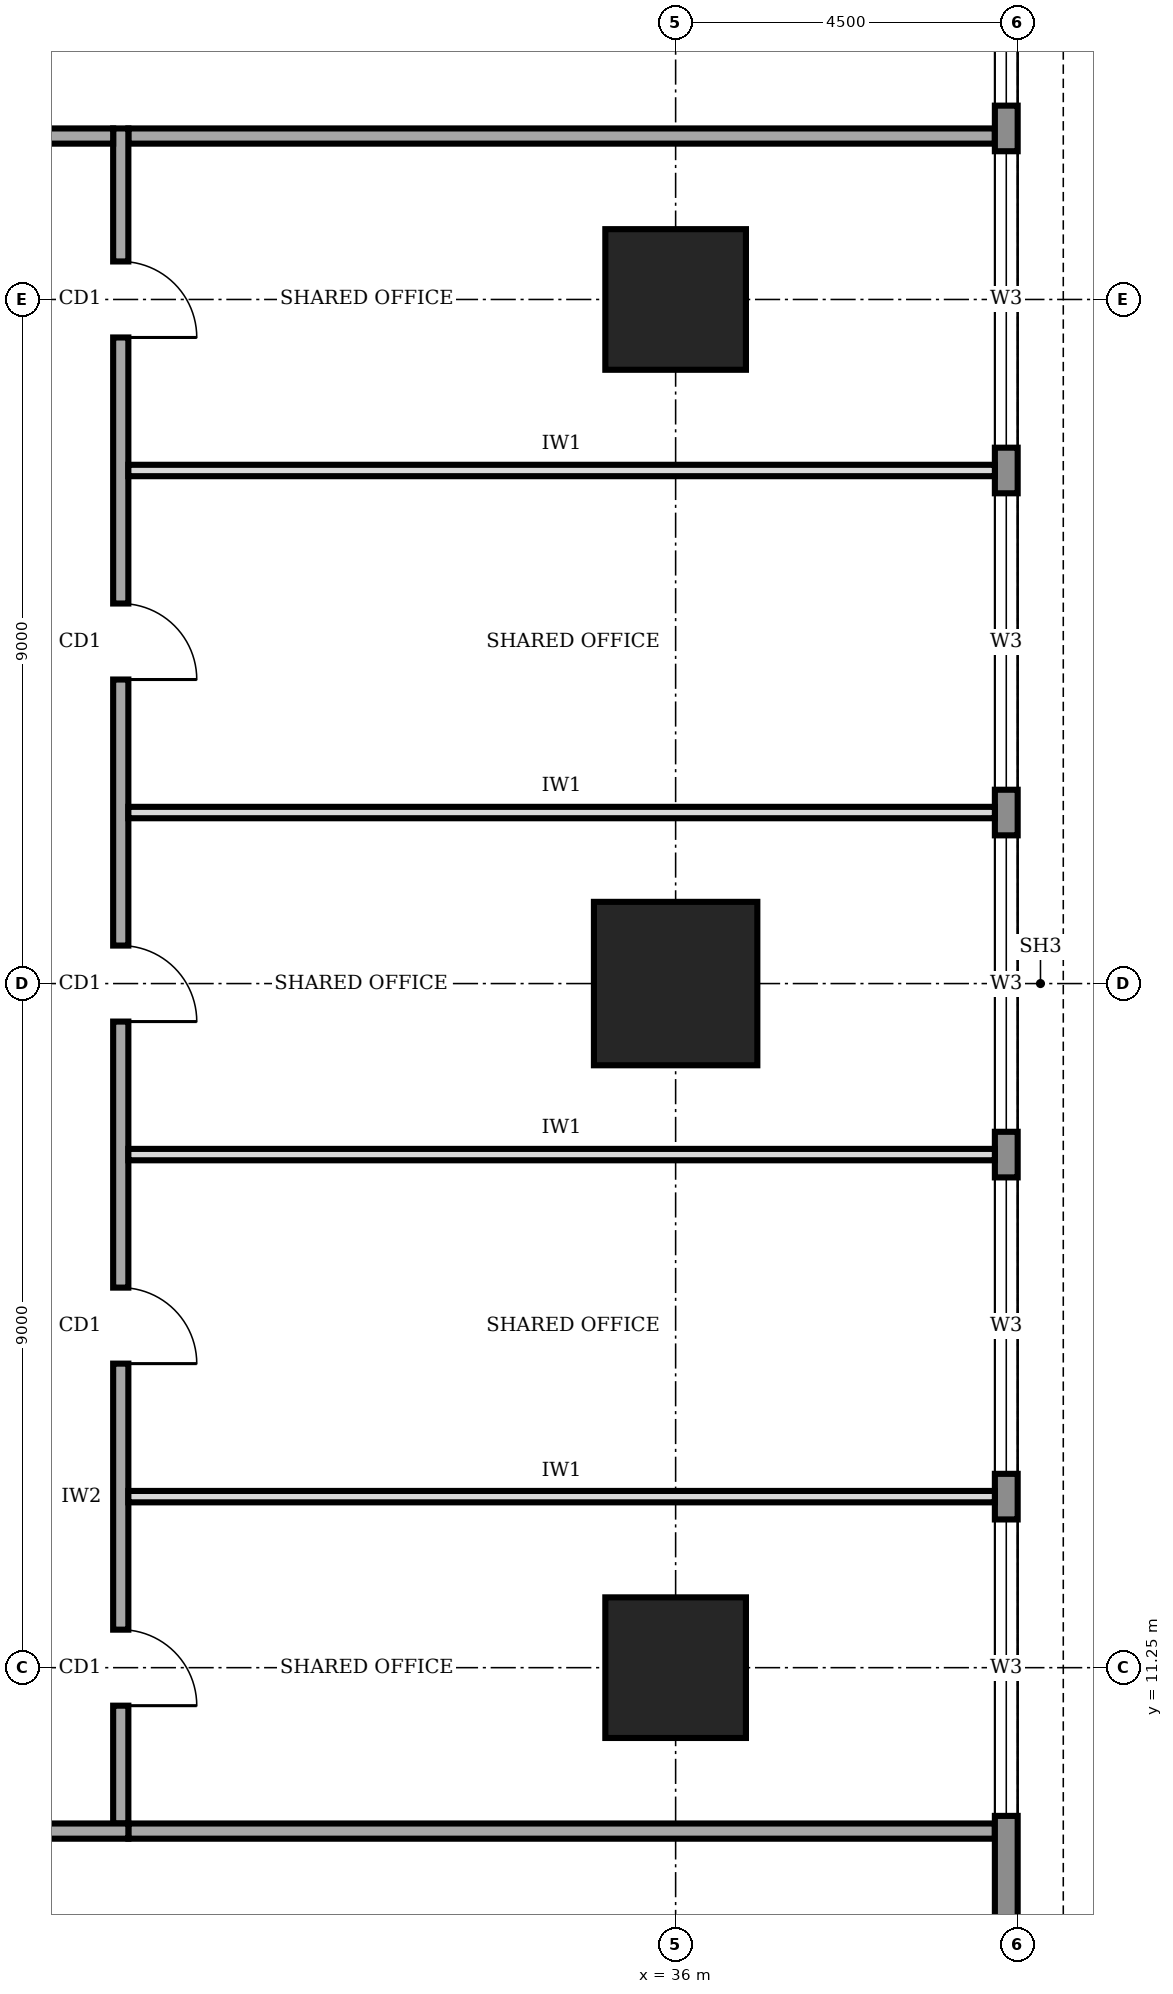
"""IFC4 building model, lengths in metres.
Left out: names, types, materials, properties, quantities, classifications, styles, units other than length and angle.
Written with IfcOpenShell. Run it as: python <this file> out.ifc"""

import sys

from ifc_helpers import new_model, si_unit, direction, frame, frame_2d, origin, origin_2d, place, context, subcontext, project, spatial, rectangle, extrude, element, fill, save


model = new_model("IFC4")
c1 = context("Model", 3, precision=1e-05, world=origin(), true_north=direction((0.0, 1.0)))
c2 = subcontext(c1, "Body", "Model", "MODEL_VIEW")
j1 = project(units=[si_unit("LENGTHUNIT", "METRE"), si_unit("PLANEANGLEUNIT", "RADIAN")], contexts=[c1])
p1 = place(None, origin())
s1 = spatial("IfcSite", under=j1, at=p1, CompositionType="ELEMENT")
p2 = place(p1, origin())
s2 = spatial("IfcBuilding", under=s1, at=p2, CompositionType="ELEMENT")
p3 = place(p2, frame((0.0, 0.0, 253.0)))
s3 = spatial("IfcBuildingStorey", under=s2, at=p3, CompositionType="ELEMENT", Elevation=253.0)
p4 = place(p3, frame((36.0, 11.25, 0.0), z_axis=(0.0, 0.0, 1.0), x_axis=(1.0, 0.0, 0.0)))
e1 = element("IfcColumn", 1, at=p4, inside=s3, PredefinedType="COLUMN", context=c2, shape_type="SweptSolid", body=[
    extrude(rectangle(XDim=1.85, YDim=1.85, at=origin_2d()), origin(), (0.0, 0.0, 1.0), 4.0),
])
p5 = place(p3, frame((36.0, 20.25, 0.0), z_axis=(0.0, 0.0, 1.0), x_axis=(1.0, 0.0, 0.0)))
e2 = element("IfcColumn", 2, at=p5, inside=s3, PredefinedType="COLUMN", context=c2, shape_type="SweptSolid", body=[
    extrude(rectangle(XDim=2.15, YDim=2.15, at=origin_2d()), origin(), (0.0, 0.0, 1.0), 4.0),
])
p6 = place(p3, frame((36.0, 29.25, 0.0), z_axis=(0.0, 0.0, 1.0), x_axis=(1.0, 0.0, 0.0)))
e3 = element("IfcColumn", 3, at=p6, inside=s3, PredefinedType="COLUMN", context=c2, shape_type="SweptSolid", body=[
    extrude(rectangle(XDim=1.85, YDim=1.85, at=origin_2d()), origin(), (0.0, 0.0, 1.0), 4.0),
])
p7 = place(p3, frame((40.35, 4.52, 0.0), z_axis=(0.0, 0.0, 1.0), x_axis=(0.0, 1.0, 0.0)))
e4 = element("IfcWall", 4, at=p7, inside=s3, PredefinedType="STANDARD", context=c2, shape_type="SweptSolid", body=[
    extrude(rectangle(XDim=31.46, YDim=0.3, at=frame_2d((15.73, 0.0))), origin(), (0.0, 0.0, 1.0), 3.75),
])
p8 = place(p7, frame((4.78, 0.0, 0.95)))
e5 = element("IfcOpeningElement", 5, at=p8, cuts=e4, PredefinedType="OPENING", context=c2, shape_type="SweptSolid", body=[
    extrude(rectangle(XDim=3.9, YDim=1.8, at=frame_2d((1.95, 0.9))), frame((0.0, 0.16, 0.0), z_axis=(0.0, -1.0, 0.0), x_axis=(1.0, 0.0, 0.0)), (0.0, 0.0, 1.0), 0.32),
])
p9 = place(p7, frame((9.28, 0.0, 0.95)))
e6 = element("IfcOpeningElement", 6, at=p9, cuts=e4, PredefinedType="OPENING", context=c2, shape_type="SweptSolid", body=[
    extrude(rectangle(XDim=3.9, YDim=1.8, at=frame_2d((1.95, 0.9))), frame((0.0, 0.16, 0.0), z_axis=(0.0, -1.0, 0.0), x_axis=(1.0, 0.0, 0.0)), (0.0, 0.0, 1.0), 0.32),
])
p10 = place(p7, frame((13.78, 0.0, 0.95)))
e7 = element("IfcOpeningElement", 7, at=p10, cuts=e4, PredefinedType="OPENING", context=c2, shape_type="SweptSolid", body=[
    extrude(rectangle(XDim=3.9, YDim=1.8, at=frame_2d((1.95, 0.9))), frame((0.0, 0.16, 0.0), z_axis=(0.0, -1.0, 0.0), x_axis=(1.0, 0.0, 0.0)), (0.0, 0.0, 1.0), 0.32),
])
p11 = place(p7, frame((18.28, 0.0, 0.95)))
e8 = element("IfcOpeningElement", 8, at=p11, cuts=e4, PredefinedType="OPENING", context=c2, shape_type="SweptSolid", body=[
    extrude(rectangle(XDim=3.9, YDim=1.8, at=frame_2d((1.95, 0.9))), frame((0.0, 0.16, 0.0), z_axis=(0.0, -1.0, 0.0), x_axis=(1.0, 0.0, 0.0)), (0.0, 0.0, 1.0), 0.32),
])
p12 = place(p7, frame((22.78, 0.0, 0.95)))
e9 = element("IfcOpeningElement", 9, at=p12, cuts=e4, PredefinedType="OPENING", context=c2, shape_type="SweptSolid", body=[
    extrude(rectangle(XDim=3.9, YDim=1.8, at=frame_2d((1.95, 0.9))), frame((0.0, 0.16, 0.0), z_axis=(0.0, -1.0, 0.0), x_axis=(1.0, 0.0, 0.0)), (0.0, 0.0, 1.0), 0.32),
])
p13 = place(p7, frame((27.28, 0.0, 0.95)))
e10 = element("IfcOpeningElement", 10, at=p13, cuts=e4, PredefinedType="OPENING", context=c2, shape_type="SweptSolid", body=[
    extrude(rectangle(XDim=3.9, YDim=1.8, at=frame_2d((1.95, 0.9))), frame((0.0, 0.16, 0.0), z_axis=(0.0, -1.0, 0.0), x_axis=(1.0, 0.0, 0.0)), (0.0, 0.0, 1.0), 0.32),
])
p14 = place(p3, frame((11.9, 9.1, 0.0), z_axis=(0.0, 0.0, 1.0), x_axis=(1.0, 0.0, 0.0)))
e11 = element("IfcWall", 11, at=p14, inside=s3, PredefinedType="SOLIDWALL", context=c2, shape_type="SweptSolid", body=[
    extrude(rectangle(XDim=16.9, YDim=0.2, at=frame_2d((8.45, 0.0))), origin(), (0.0, 0.0, 1.0), 3.75),
])
p15 = place(p14, frame((2.25, 0.0, 0.0)))
e12 = element("IfcOpeningElement", 12, at=p15, cuts=e11, PredefinedType="OPENING", context=c2, shape_type="SweptSolid", body=[
    extrude(rectangle(XDim=1.4, YDim=2.1, at=frame_2d((0.7, 1.05))), frame((0.0, 0.11, 0.0), z_axis=(0.0, -1.0, 0.0), x_axis=(1.0, 0.0, 0.0)), (0.0, 0.0, 1.0), 0.22),
])
p16 = place(p14, frame((10.8, 0.0, 0.0)))
e13 = element("IfcOpeningElement", 13, at=p16, cuts=e11, PredefinedType="OPENING", context=c2, shape_type="SweptSolid", body=[
    extrude(rectangle(XDim=1.4, YDim=2.1, at=frame_2d((0.7, 1.05))), frame((0.0, 0.11, 0.0), z_axis=(0.0, -1.0, 0.0), x_axis=(1.0, 0.0, 0.0)), (0.0, 0.0, 1.0), 0.22),
])
p17 = place(p3, frame((28.7, 9.2, 0.0), z_axis=(0.0, 0.0, 1.0), x_axis=(0.0, 1.0, 0.0)))
e14 = element("IfcWall", 14, at=p17, inside=s3, PredefinedType="SOLIDWALL", context=c2, shape_type="SweptSolid", body=[
    extrude(rectangle(XDim=22.3, YDim=0.2, at=frame_2d((11.15, 0.0))), origin(), (0.0, 0.0, 1.0), 3.75),
])
p18 = place(p17, frame((1.55, 0.0, 0.0)))
e15 = element("IfcOpeningElement", 15, at=p18, cuts=e14, PredefinedType="OPENING", context=c2, shape_type="SweptSolid", body=[
    extrude(rectangle(XDim=1.0, YDim=2.1, at=frame_2d((0.5, 1.05))), frame((0.0, 0.11, 0.0), z_axis=(0.0, -1.0, 0.0), x_axis=(1.0, 0.0, 0.0)), (0.0, 0.0, 1.0), 0.22),
])
p19 = place(p17, frame((6.05, 0.0, 0.0)))
e16 = element("IfcOpeningElement", 16, at=p19, cuts=e14, PredefinedType="OPENING", context=c2, shape_type="SweptSolid", body=[
    extrude(rectangle(XDim=1.0, YDim=2.1, at=frame_2d((0.5, 1.05))), frame((0.0, 0.11, 0.0), z_axis=(0.0, -1.0, 0.0), x_axis=(1.0, 0.0, 0.0)), (0.0, 0.0, 1.0), 0.22),
])
p20 = place(p17, frame((10.55, 0.0, 0.0)))
e17 = element("IfcOpeningElement", 17, at=p20, cuts=e14, PredefinedType="OPENING", context=c2, shape_type="SweptSolid", body=[
    extrude(rectangle(XDim=1.0, YDim=2.1, at=frame_2d((0.5, 1.05))), frame((0.0, 0.11, 0.0), z_axis=(0.0, -1.0, 0.0), x_axis=(1.0, 0.0, 0.0)), (0.0, 0.0, 1.0), 0.22),
])
p21 = place(p17, frame((15.05, 0.0, 0.0)))
e18 = element("IfcOpeningElement", 18, at=p21, cuts=e14, PredefinedType="OPENING", context=c2, shape_type="SweptSolid", body=[
    extrude(rectangle(XDim=1.0, YDim=2.1, at=frame_2d((0.5, 1.05))), frame((0.0, 0.11, 0.0), z_axis=(0.0, -1.0, 0.0), x_axis=(1.0, 0.0, 0.0)), (0.0, 0.0, 1.0), 0.22),
])
p22 = place(p17, frame((19.55, 0.0, 0.0)))
e19 = element("IfcOpeningElement", 19, at=p22, cuts=e14, PredefinedType="OPENING", context=c2, shape_type="SweptSolid", body=[
    extrude(rectangle(XDim=1.0, YDim=2.1, at=frame_2d((0.5, 1.05))), frame((0.0, 0.11, 0.0), z_axis=(0.0, -1.0, 0.0), x_axis=(1.0, 0.0, 0.0)), (0.0, 0.0, 1.0), 0.22),
])
p23 = place(p3, frame((28.6, 31.4, 0.0), z_axis=(0.0, 0.0, 1.0), x_axis=(-1.0, 0.0, 0.0)))
e20 = element("IfcWall", 20, at=p23, inside=s3, PredefinedType="SOLIDWALL", context=c2, shape_type="SweptSolid", body=[
    extrude(rectangle(XDim=16.9, YDim=0.2, at=frame_2d((8.45, 0.0))), origin(), (0.0, 0.0, 1.0), 3.75),
])
p24 = place(p23, frame((15.425, 0.0, 0.0)))
e21 = element("IfcOpeningElement", 21, at=p24, cuts=e20, PredefinedType="OPENING", context=c2, shape_type="SweptSolid", body=[
    extrude(rectangle(XDim=1.0, YDim=2.1, at=frame_2d((0.5, 1.05))), frame((0.0, 0.11, 0.0), z_axis=(0.0, -1.0, 0.0), x_axis=(1.0, 0.0, 0.0)), (0.0, 0.0, 1.0), 0.22),
])
p25 = place(p23, frame((10.1, 0.0, 0.0)))
e22 = element("IfcOpeningElement", 22, at=p25, cuts=e20, PredefinedType="OPENING", context=c2, shape_type="SweptSolid", body=[
    extrude(rectangle(XDim=1.0, YDim=2.1, at=frame_2d((0.5, 1.05))), frame((0.0, 0.11, 0.0), z_axis=(0.0, -1.0, 0.0), x_axis=(1.0, 0.0, 0.0)), (0.0, 0.0, 1.0), 0.22),
])
p26 = place(p23, frame((2.25, 0.0, 0.0)))
e23 = element("IfcOpeningElement", 23, at=p26, cuts=e20, PredefinedType="OPENING", context=c2, shape_type="SweptSolid", body=[
    extrude(rectangle(XDim=1.4, YDim=2.1, at=frame_2d((0.7, 1.05))), frame((0.0, 0.11, 0.0), z_axis=(0.0, -1.0, 0.0), x_axis=(1.0, 0.0, 0.0)), (0.0, 0.0, 1.0), 0.22),
])
for number, where, z_axis, x_axis in (
    (24, (28.8, 9.1, 0.0), (0.0, 0.0, 1.0), (1.0, 0.0, 0.0)),
    (25, (28.8, 31.4, 0.0), (0.0, 0.0, 1.0), (1.0, 0.0, 0.0)),
):
    element("IfcWall", number, at=place(p3, frame(where, z_axis=z_axis, x_axis=x_axis)), inside=s3, PredefinedType="SOLIDWALL", context=c2, shape_type="SweptSolid", body=[
        extrude(rectangle(XDim=11.4, YDim=0.2, at=frame_2d((5.7, 0.0))), origin(), (0.0, 0.0, 1.0), 3.75),
    ])
for number, where, z_axis, x_axis in (
    (26, (28.8, 13.5, 0.0), (0.0, 0.0, 1.0), (1.0, 0.0, 0.0)),
    (27, (28.8, 18.0, 0.0), (0.0, 0.0, 1.0), (1.0, 0.0, 0.0)),
    (28, (28.8, 22.5, 0.0), (0.0, 0.0, 1.0), (1.0, 0.0, 0.0)),
    (29, (28.8, 27.0, 0.0), (0.0, 0.0, 1.0), (1.0, 0.0, 0.0)),
):
    element("IfcWall", number, at=place(p3, frame(where, z_axis=z_axis, x_axis=x_axis)), inside=s3, PredefinedType="PARTITIONING", context=c2, shape_type="SweptSolid", body=[
        extrude(rectangle(XDim=11.4, YDim=0.15, at=frame_2d((5.7, 0.0))), origin(), (0.0, 0.0, 1.0), 3.75),
    ])
p27 = place(p8, origin())
e30 = element("IfcWindow", 30, at=p27, inside=s3, PartitioningType="SINGLE_PANEL", PredefinedType="WINDOW", context=c2, shape_type="SweptSolid", body=[
    extrude(rectangle(XDim=3.9, YDim=1.8, at=frame_2d((1.95, 0.9))), frame((0.0, 0.03, 0.0), z_axis=(0.0, -1.0, 0.0), x_axis=(1.0, 0.0, 0.0)), (0.0, 0.0, 1.0), 0.06),
])
fill(e5, e30)
p28 = place(p9, origin())
e31 = element("IfcWindow", 31, at=p28, inside=s3, PartitioningType="SINGLE_PANEL", PredefinedType="WINDOW", context=c2, shape_type="SweptSolid", body=[
    extrude(rectangle(XDim=3.9, YDim=1.8, at=frame_2d((1.95, 0.9))), frame((0.0, 0.03, 0.0), z_axis=(0.0, -1.0, 0.0), x_axis=(1.0, 0.0, 0.0)), (0.0, 0.0, 1.0), 0.06),
])
fill(e6, e31)
p29 = place(p10, origin())
e32 = element("IfcWindow", 32, at=p29, inside=s3, PartitioningType="SINGLE_PANEL", PredefinedType="WINDOW", context=c2, shape_type="SweptSolid", body=[
    extrude(rectangle(XDim=3.9, YDim=1.8, at=frame_2d((1.95, 0.9))), frame((0.0, 0.03, 0.0), z_axis=(0.0, -1.0, 0.0), x_axis=(1.0, 0.0, 0.0)), (0.0, 0.0, 1.0), 0.06),
])
fill(e7, e32)
p30 = place(p11, origin())
e33 = element("IfcWindow", 33, at=p30, inside=s3, PartitioningType="SINGLE_PANEL", PredefinedType="WINDOW", context=c2, shape_type="SweptSolid", body=[
    extrude(rectangle(XDim=3.9, YDim=1.8, at=frame_2d((1.95, 0.9))), frame((0.0, 0.03, 0.0), z_axis=(0.0, -1.0, 0.0), x_axis=(1.0, 0.0, 0.0)), (0.0, 0.0, 1.0), 0.06),
])
fill(e8, e33)
p31 = place(p12, origin())
e34 = element("IfcWindow", 34, at=p31, inside=s3, PartitioningType="SINGLE_PANEL", PredefinedType="WINDOW", context=c2, shape_type="SweptSolid", body=[
    extrude(rectangle(XDim=3.9, YDim=1.8, at=frame_2d((1.95, 0.9))), frame((0.0, 0.03, 0.0), z_axis=(0.0, -1.0, 0.0), x_axis=(1.0, 0.0, 0.0)), (0.0, 0.0, 1.0), 0.06),
])
fill(e9, e34)
p32 = place(p13, origin())
e35 = element("IfcWindow", 35, at=p32, inside=s3, PartitioningType="SINGLE_PANEL", PredefinedType="WINDOW", context=c2, shape_type="SweptSolid", body=[
    extrude(rectangle(XDim=3.9, YDim=1.8, at=frame_2d((1.95, 0.9))), frame((0.0, 0.03, 0.0), z_axis=(0.0, -1.0, 0.0), x_axis=(1.0, 0.0, 0.0)), (0.0, 0.0, 1.0), 0.06),
])
fill(e10, e35)
p33 = place(p18, frame((1.0, 0.0, 0.0), z_axis=(0.0, 0.0, 1.0), x_axis=(-1.0, 0.0, 0.0)))
e36 = element("IfcDoor", 36, at=p33, inside=s3, OperationType="SINGLE_SWING_RIGHT", PredefinedType="DOOR", context=c2, shape_type="SweptSolid", body=[
    extrude(rectangle(XDim=1.0, YDim=2.1, at=frame_2d((0.5, 1.05))), frame((0.0, 0.025, 0.0), z_axis=(0.0, -1.0, 0.0), x_axis=(1.0, 0.0, 0.0)), (0.0, 0.0, 1.0), 0.05),
])
fill(e15, e36)
p34 = place(p19, frame((1.0, 0.0, 0.0), z_axis=(0.0, 0.0, 1.0), x_axis=(-1.0, 0.0, 0.0)))
e37 = element("IfcDoor", 37, at=p34, inside=s3, OperationType="SINGLE_SWING_RIGHT", PredefinedType="DOOR", context=c2, shape_type="SweptSolid", body=[
    extrude(rectangle(XDim=1.0, YDim=2.1, at=frame_2d((0.5, 1.05))), frame((0.0, 0.025, 0.0), z_axis=(0.0, -1.0, 0.0), x_axis=(1.0, 0.0, 0.0)), (0.0, 0.0, 1.0), 0.05),
])
fill(e16, e37)
p35 = place(p20, frame((1.0, 0.0, 0.0), z_axis=(0.0, 0.0, 1.0), x_axis=(-1.0, 0.0, 0.0)))
e38 = element("IfcDoor", 38, at=p35, inside=s3, OperationType="SINGLE_SWING_RIGHT", PredefinedType="DOOR", context=c2, shape_type="SweptSolid", body=[
    extrude(rectangle(XDim=1.0, YDim=2.1, at=frame_2d((0.5, 1.05))), frame((0.0, 0.025, 0.0), z_axis=(0.0, -1.0, 0.0), x_axis=(1.0, 0.0, 0.0)), (0.0, 0.0, 1.0), 0.05),
])
fill(e17, e38)
p36 = place(p21, frame((1.0, 0.0, 0.0), z_axis=(0.0, 0.0, 1.0), x_axis=(-1.0, 0.0, 0.0)))
e39 = element("IfcDoor", 39, at=p36, inside=s3, OperationType="SINGLE_SWING_RIGHT", PredefinedType="DOOR", context=c2, shape_type="SweptSolid", body=[
    extrude(rectangle(XDim=1.0, YDim=2.1, at=frame_2d((0.5, 1.05))), frame((0.0, 0.025, 0.0), z_axis=(0.0, -1.0, 0.0), x_axis=(1.0, 0.0, 0.0)), (0.0, 0.0, 1.0), 0.05),
])
fill(e18, e39)
p37 = place(p22, frame((1.0, 0.0, 0.0), z_axis=(0.0, 0.0, 1.0), x_axis=(-1.0, 0.0, 0.0)))
e40 = element("IfcDoor", 40, at=p37, inside=s3, OperationType="SINGLE_SWING_RIGHT", PredefinedType="DOOR", context=c2, shape_type="SweptSolid", body=[
    extrude(rectangle(XDim=1.0, YDim=2.1, at=frame_2d((0.5, 1.05))), frame((0.0, 0.025, 0.0), z_axis=(0.0, -1.0, 0.0), x_axis=(1.0, 0.0, 0.0)), (0.0, 0.0, 1.0), 0.05),
])
fill(e19, e40)
save(model, sys.argv[1])
